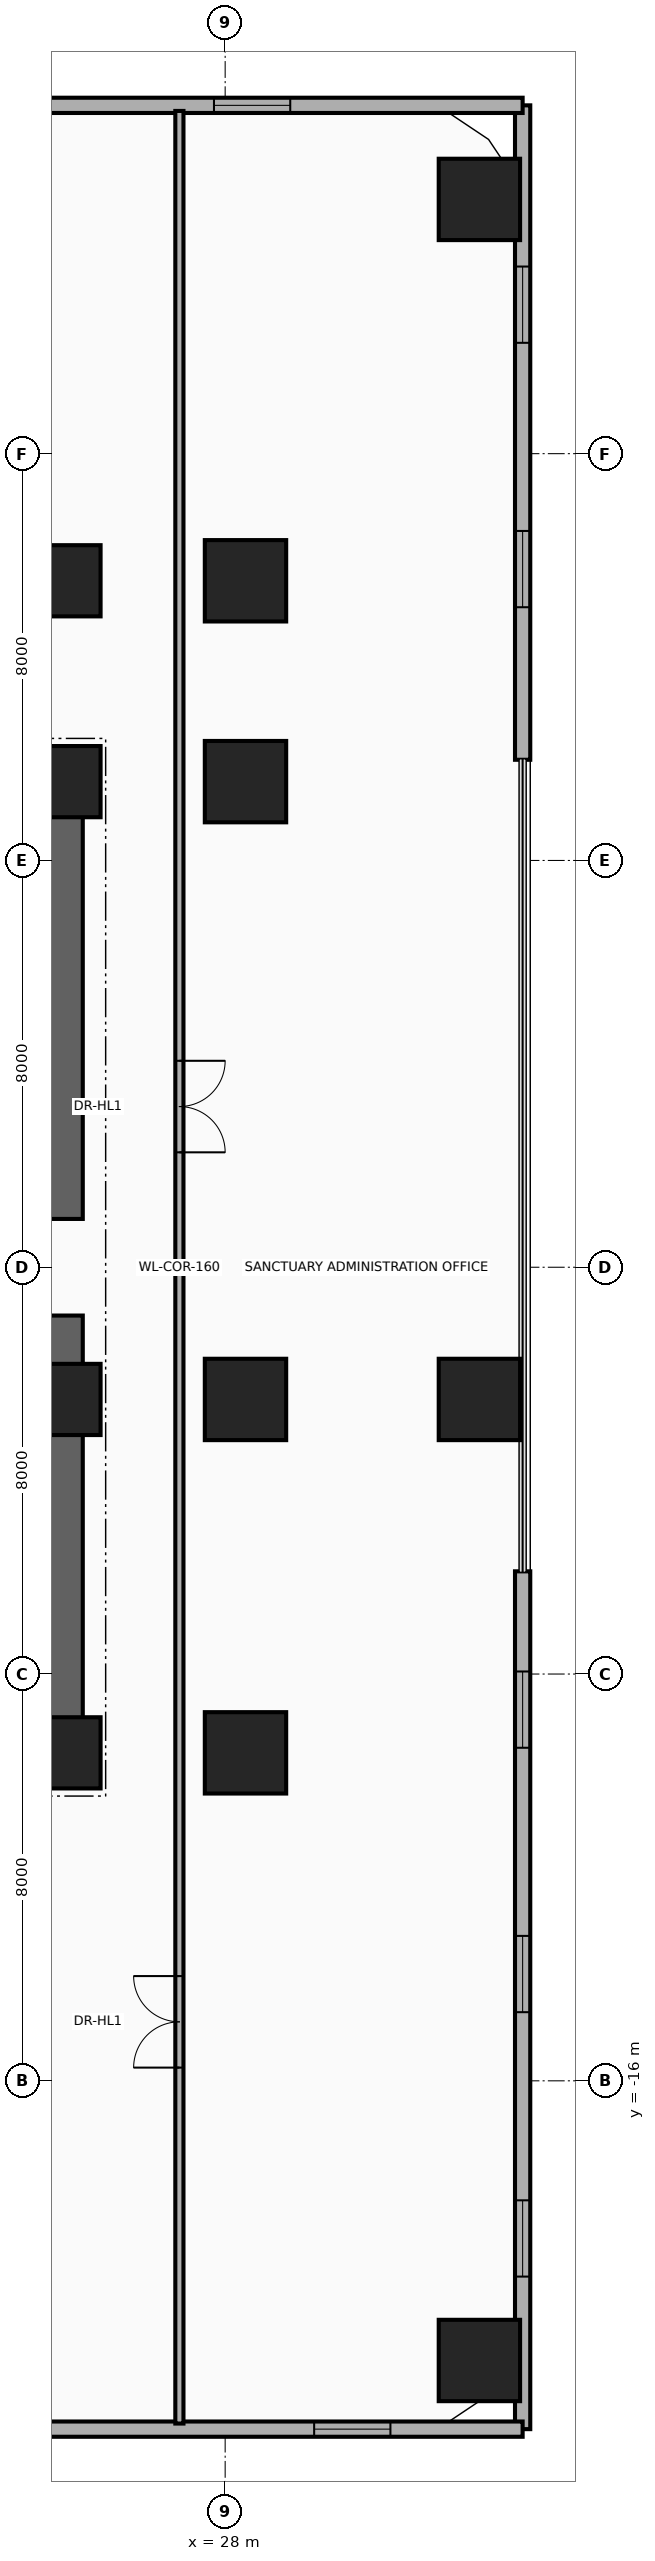
"""IFC4 building model, lengths in metres.
Left out: names, types, materials, properties, quantities, classifications, styles, units other than length and angle.
Written with IfcOpenShell. Run it as: python <this file> out.ifc"""

import sys

from ifc_helpers import new_model, si_unit, direction, frame, frame_2d, origin, origin_2d, place, context, subcontext, project, spatial, rectangle, extrude, source, transform, mapped, element, fill, save


model = new_model("IFC4")
c1 = context("Model", 3, precision=1e-05, world=origin(), true_north=direction((0.0, 1.0)))
c2 = subcontext(c1, "Body", "Model", "MODEL_VIEW")
j1 = project(units=[si_unit("LENGTHUNIT", "METRE"), si_unit("PLANEANGLEUNIT", "RADIAN")], contexts=[c1])
p1 = place(None, origin())
s1 = spatial("IfcSite", under=j1, at=p1, CompositionType="ELEMENT")
p2 = place(p1, origin())
s2 = spatial("IfcBuilding", under=s1, at=p2, CompositionType="ELEMENT")
p3 = place(p2, frame((0.0, 0.0, 5.2)))
s3 = spatial("IfcBuildingStorey", under=s2, at=p3, CompositionType="ELEMENT", Elevation=5.2)
for number, where, z_axis, x_axis in (
    (1, (24.85, -9.9, 0.0), (0.0, 0.0, 1.0), (0.0, 1.0, 0.0)),
    (2, (24.85, 0.95, 0.0), (0.0, 0.0, 1.0), (0.0, 1.0, 0.0)),
):
    element("IfcWall", number, at=place(p3, frame(where, z_axis=z_axis, x_axis=x_axis)), inside=s3, PredefinedType="SHEAR", context=c2, shape_type="SweptSolid", body=[
        extrude(rectangle(XDim=8.95, YDim=0.7, at=frame_2d((4.475, 0.0))), origin(), (0.0, 0.0, 1.0), 4.92),
    ])
for number, where, z_axis, x_axis in (
    (3, (15.85, 9.55, 0.0), (0.0, 0.0, 1.0), (1.0, 0.0, 0.0)),
    (4, (15.85, -9.55, 0.0), (0.0, 0.0, 1.0), (1.0, 0.0, 0.0)),
):
    element("IfcWall", number, at=place(p3, frame(where, z_axis=z_axis, x_axis=x_axis)), inside=s3, PredefinedType="SHEAR", context=c2, shape_type="SweptSolid", body=[
        extrude(rectangle(XDim=9.0, YDim=0.7, at=frame_2d((4.5, 0.0))), origin(), (0.0, 0.0, 1.0), 4.92),
    ])
m1 = source(origin(), c2, "Body", "SweptSolid", [
    extrude(rectangle(XDim=1.4, YDim=1.4, at=origin_2d()), origin(), (0.0, 0.0, 1.0), 5.2),
])
p4 = place(p3, frame((24.85, -9.55, 0.0), z_axis=(0.0, 0.0, 1.0), x_axis=(1.0, 0.0, 0.0)))
e5 = element("IfcColumn", 5, at=p4, inside=s3, PredefinedType="COLUMN", context=c2, shape_type="MappedRepresentation", body=[
    mapped(m1, transform((0.0, 0.0, 0.0), x_axis=(1.0, 0.0, 0.0), y_axis=(0.0, 1.0, 0.0), z_axis=(0.0, 0.0, 1.0), scale=1.0)),
])
m2 = source(origin(), c2, "Body", "SweptSolid", [
    extrude(rectangle(XDim=1.6, YDim=1.6, at=origin_2d()), origin(), (0.0, 0.0, 1.0), 5.2),
])
p5 = place(p3, frame((28.4, -9.55, 0.0), z_axis=(0.0, 0.0, 1.0), x_axis=(1.0, 0.0, 0.0)))
e6 = element("IfcColumn", 6, at=p5, inside=s3, PredefinedType="COLUMN", context=c2, shape_type="MappedRepresentation", body=[
    mapped(m2, transform((0.0, 0.0, 0.0), x_axis=(1.0, 0.0, 0.0), y_axis=(0.0, 1.0, 0.0), z_axis=(0.0, 0.0, 1.0), scale=1.0)),
])
p6 = place(p3, frame((24.85, -2.6, 0.0), z_axis=(0.0, 0.0, 1.0), x_axis=(1.0, 0.0, 0.0)))
e7 = element("IfcColumn", 7, at=p6, inside=s3, PredefinedType="COLUMN", context=c2, shape_type="MappedRepresentation", body=[
    mapped(m1, transform((0.0, 0.0, 0.0), x_axis=(1.0, 0.0, 0.0), y_axis=(0.0, 1.0, 0.0), z_axis=(0.0, 0.0, 1.0), scale=1.0)),
])
p7 = place(p3, frame((28.4, -2.6, 0.0), z_axis=(0.0, 0.0, 1.0), x_axis=(1.0, 0.0, 0.0)))
e8 = element("IfcColumn", 8, at=p7, inside=s3, PredefinedType="COLUMN", context=c2, shape_type="MappedRepresentation", body=[
    mapped(m2, transform((0.0, 0.0, 0.0), x_axis=(1.0, 0.0, 0.0), y_axis=(0.0, 1.0, 0.0), z_axis=(0.0, 0.0, 1.0), scale=1.0)),
])
p8 = place(p3, frame((24.85, 9.55, 0.0), z_axis=(0.0, 0.0, 1.0), x_axis=(1.0, 0.0, 0.0)))
e9 = element("IfcColumn", 9, at=p8, inside=s3, PredefinedType="COLUMN", context=c2, shape_type="MappedRepresentation", body=[
    mapped(m1, transform((0.0, 0.0, 0.0), x_axis=(1.0, 0.0, 0.0), y_axis=(0.0, 1.0, 0.0), z_axis=(0.0, 0.0, 1.0), scale=1.0)),
])
p9 = place(p3, frame((28.4, 9.55, 0.0), z_axis=(0.0, 0.0, 1.0), x_axis=(1.0, 0.0, 0.0)))
e10 = element("IfcColumn", 10, at=p9, inside=s3, PredefinedType="COLUMN", context=c2, shape_type="MappedRepresentation", body=[
    mapped(m2, transform((0.0, 0.0, 0.0), x_axis=(1.0, 0.0, 0.0), y_axis=(0.0, 1.0, 0.0), z_axis=(0.0, 0.0, 1.0), scale=1.0)),
])
p10 = place(p3, frame((24.85, 13.5, 0.0), z_axis=(0.0, 0.0, 1.0), x_axis=(1.0, 0.0, 0.0)))
e11 = element("IfcColumn", 11, at=p10, inside=s3, PredefinedType="COLUMN", context=c2, shape_type="MappedRepresentation", body=[
    mapped(m1, transform((0.0, 0.0, 0.0), x_axis=(1.0, 0.0, 0.0), y_axis=(0.0, 1.0, 0.0), z_axis=(0.0, 0.0, 1.0), scale=1.0)),
])
for number, where, z_axis, x_axis in (
    (12, (28.4, 13.5, 0.0), (0.0, 0.0, 1.0), (1.0, 0.0, 0.0)),
    (13, (33.0, 21.0, 0.0), (0.0, 0.0, 1.0), (1.0, 0.0, 0.0)),
    (14, (33.0, -2.6, 0.0), (0.0, 0.0, 1.0), (1.0, 0.0, 0.0)),
    (15, (33.0, -21.5, 0.0), (0.0, 0.0, 1.0), (1.0, 0.0, 0.0)),
):
    element("IfcColumn", number, at=place(p3, frame(where, z_axis=z_axis, x_axis=x_axis)), inside=s3, PredefinedType="COLUMN", context=c2, shape_type="MappedRepresentation", body=[
        mapped(m2, transform((0.0, 0.0, 0.0), x_axis=(1.0, 0.0, 0.0), y_axis=(0.0, 1.0, 0.0), z_axis=(0.0, 0.0, 1.0), scale=1.0)),
    ])
p11 = place(p3, frame((33.85, -22.85, 0.0), z_axis=(0.0, 0.0, 1.0), x_axis=(0.0, 1.0, 0.0)))
e16 = element("IfcWall", 16, at=p11, inside=s3, PredefinedType="SOLIDWALL", context=c2, shape_type="SweptSolid", body=[
    extrude(rectangle(XDim=16.87, YDim=0.3, at=frame_2d((8.435, 0.0))), origin(), (0.0, 0.0, 1.0), 4.92),
])
p12 = place(p11, frame((3.0, 0.0, 0.9)))
e17 = element("IfcOpeningElement", 17, at=p12, cuts=e16, PredefinedType="OPENING", context=c2, shape_type="SweptSolid", body=[
    extrude(rectangle(XDim=1.5, YDim=1.75, at=frame_2d((0.75, 0.875))), frame((0.0, 0.165, 0.0), z_axis=(0.0, -1.0, 0.0), x_axis=(1.0, 0.0, 0.0)), (0.0, 0.0, 1.0), 0.33),
])
p13 = place(p11, frame((8.2, 0.0, 0.9)))
e18 = element("IfcOpeningElement", 18, at=p13, cuts=e16, PredefinedType="OPENING", context=c2, shape_type="SweptSolid", body=[
    extrude(rectangle(XDim=1.5, YDim=1.75, at=frame_2d((0.75, 0.875))), frame((0.0, 0.165, 0.0), z_axis=(0.0, -1.0, 0.0), x_axis=(1.0, 0.0, 0.0)), (0.0, 0.0, 1.0), 0.33),
])
p14 = place(p11, frame((13.4, 0.0, 0.9)))
e19 = element("IfcOpeningElement", 19, at=p14, cuts=e16, PredefinedType="OPENING", context=c2, shape_type="SweptSolid", body=[
    extrude(rectangle(XDim=1.5, YDim=1.75, at=frame_2d((0.75, 0.875))), frame((0.0, 0.165, 0.0), z_axis=(0.0, -1.0, 0.0), x_axis=(1.0, 0.0, 0.0)), (0.0, 0.0, 1.0), 0.33),
])
p15 = place(p3, frame((33.85, 9.98, 0.0), z_axis=(0.0, 0.0, 1.0), x_axis=(0.0, 1.0, 0.0)))
e20 = element("IfcWall", 20, at=p15, inside=s3, PredefinedType="SOLIDWALL", context=c2, shape_type="SweptSolid", body=[
    extrude(rectangle(XDim=12.87, YDim=0.3, at=frame_2d((6.435, 0.0))), origin(), (0.0, 0.0, 1.0), 4.92),
])
p16 = place(p15, frame((3.0, 0.0, 0.9)))
e21 = element("IfcOpeningElement", 21, at=p16, cuts=e20, PredefinedType="OPENING", context=c2, shape_type="SweptSolid", body=[
    extrude(rectangle(XDim=1.5, YDim=1.75, at=frame_2d((0.75, 0.875))), frame((0.0, 0.165, 0.0), z_axis=(0.0, -1.0, 0.0), x_axis=(1.0, 0.0, 0.0)), (0.0, 0.0, 1.0), 0.33),
])
p17 = place(p15, frame((8.2, 0.0, 0.9)))
e22 = element("IfcOpeningElement", 22, at=p17, cuts=e20, PredefinedType="OPENING", context=c2, shape_type="SweptSolid", body=[
    extrude(rectangle(XDim=1.5, YDim=1.75, at=frame_2d((0.75, 0.875))), frame((0.0, 0.165, 0.0), z_axis=(0.0, -1.0, 0.0), x_axis=(1.0, 0.0, 0.0)), (0.0, 0.0, 1.0), 0.33),
])
p18 = place(p3, frame((12.15, -22.85, 0.0), z_axis=(0.0, 0.0, 1.0), x_axis=(1.0, 0.0, 0.0)))
e23 = element("IfcWall", 23, at=p18, inside=s3, PredefinedType="SOLIDWALL", context=c2, shape_type="SweptSolid", body=[
    extrude(rectangle(XDim=21.7, YDim=0.3, at=frame_2d((10.85, 0.0))), origin(), (0.0, 0.0, 1.0), 4.92),
])
p19 = place(p18, frame((3.2, 0.0, 0.9)))
e24 = element("IfcOpeningElement", 24, at=p19, cuts=e23, PredefinedType="OPENING", context=c2, shape_type="SweptSolid", body=[
    extrude(rectangle(XDim=1.5, YDim=1.75, at=frame_2d((0.75, 0.875))), frame((0.0, 0.165, 0.0), z_axis=(0.0, -1.0, 0.0), x_axis=(1.0, 0.0, 0.0)), (0.0, 0.0, 1.0), 0.33),
])
p20 = place(p18, frame((9.8, 0.0, 0.9)))
e25 = element("IfcOpeningElement", 25, at=p20, cuts=e23, PredefinedType="OPENING", context=c2, shape_type="SweptSolid", body=[
    extrude(rectangle(XDim=1.5, YDim=1.75, at=frame_2d((0.75, 0.875))), frame((0.0, 0.165, 0.0), z_axis=(0.0, -1.0, 0.0), x_axis=(1.0, 0.0, 0.0)), (0.0, 0.0, 1.0), 0.33),
])
p21 = place(p18, frame((17.6, 0.0, 0.9)))
e26 = element("IfcOpeningElement", 26, at=p21, cuts=e23, PredefinedType="OPENING", context=c2, shape_type="SweptSolid", body=[
    extrude(rectangle(XDim=1.5, YDim=1.75, at=frame_2d((0.75, 0.875))), frame((0.0, 0.165, 0.0), z_axis=(0.0, -1.0, 0.0), x_axis=(1.0, 0.0, 0.0)), (0.0, 0.0, 1.0), 0.33),
])
p22 = place(p3, frame((9.98, 22.85, 0.0), z_axis=(0.0, 0.0, 1.0), x_axis=(1.0, 0.0, 0.0)))
e27 = element("IfcWall", 27, at=p22, inside=s3, PredefinedType="SOLIDWALL", context=c2, shape_type="SweptSolid", body=[
    extrude(rectangle(XDim=23.87, YDim=0.3, at=frame_2d((11.935, 0.0))), origin(), (0.0, 0.0, 1.0), 4.92),
])
p23 = place(p22, frame((3.2, 0.0, 0.9)))
e28 = element("IfcOpeningElement", 28, at=p23, cuts=e27, PredefinedType="OPENING", context=c2, shape_type="SweptSolid", body=[
    extrude(rectangle(XDim=1.5, YDim=1.75, at=frame_2d((0.75, 0.875))), frame((0.0, 0.165, 0.0), z_axis=(0.0, -1.0, 0.0), x_axis=(1.0, 0.0, 0.0)), (0.0, 0.0, 1.0), 0.33),
])
p24 = place(p22, frame((10.0, 0.0, 0.9)))
e29 = element("IfcOpeningElement", 29, at=p24, cuts=e27, PredefinedType="OPENING", context=c2, shape_type="SweptSolid", body=[
    extrude(rectangle(XDim=1.5, YDim=1.75, at=frame_2d((0.75, 0.875))), frame((0.0, 0.165, 0.0), z_axis=(0.0, -1.0, 0.0), x_axis=(1.0, 0.0, 0.0)), (0.0, 0.0, 1.0), 0.33),
])
p25 = place(p22, frame((17.8, 0.0, 0.9)))
e30 = element("IfcOpeningElement", 30, at=p25, cuts=e27, PredefinedType="OPENING", context=c2, shape_type="SweptSolid", body=[
    extrude(rectangle(XDim=1.5, YDim=1.75, at=frame_2d((0.75, 0.875))), frame((0.0, 0.165, 0.0), z_axis=(0.0, -1.0, 0.0), x_axis=(1.0, 0.0, 0.0)), (0.0, 0.0, 1.0), 0.33),
])
p26 = place(p3, frame((27.1, -22.74, 0.0), z_axis=(0.0, 0.0, 1.0), x_axis=(0.0, 1.0, 0.0)))
e31 = element("IfcWall", 31, at=p26, inside=s3, PredefinedType="PARTITIONING", context=c2, shape_type="SweptSolid", body=[
    extrude(rectangle(XDim=45.48, YDim=0.16, at=frame_2d((22.74, 0.0))), origin(), (0.0, 0.0, 1.0), 3.957),
])
p27 = place(p26, frame((7.0, 0.0, 0.0)))
e32 = element("IfcOpeningElement", 32, at=p27, cuts=e31, PredefinedType="OPENING", context=c2, shape_type="SweptSolid", body=[
    extrude(rectangle(XDim=1.8, YDim=2.15, at=frame_2d((0.9, 1.075))), frame((0.0, 0.095, 0.0), z_axis=(0.0, -1.0, 0.0), x_axis=(1.0, 0.0, 0.0)), (0.0, 0.0, 1.0), 0.19),
])
p28 = place(p26, frame((25.0, 0.0, 0.0)))
e33 = element("IfcOpeningElement", 33, at=p28, cuts=e31, PredefinedType="OPENING", context=c2, shape_type="SweptSolid", body=[
    extrude(rectangle(XDim=1.8, YDim=2.15, at=frame_2d((0.9, 1.075))), frame((0.0, 0.095, 0.0), z_axis=(0.0, -1.0, 0.0), x_axis=(1.0, 0.0, 0.0)), (0.0, 0.0, 1.0), 0.19),
])
p29 = place(p12, origin())
e34 = element("IfcWindow", 34, at=p29, inside=s3, PartitioningType="SINGLE_PANEL", PredefinedType="WINDOW", context=c2, shape_type="SweptSolid", body=[
    extrude(rectangle(XDim=1.5, YDim=1.75, at=frame_2d((0.75, 0.875))), frame((0.0, 0.03, 0.0), z_axis=(0.0, -1.0, 0.0), x_axis=(1.0, 0.0, 0.0)), (0.0, 0.0, 1.0), 0.06),
])
fill(e17, e34)
p30 = place(p13, origin())
e35 = element("IfcWindow", 35, at=p30, inside=s3, PartitioningType="SINGLE_PANEL", PredefinedType="WINDOW", context=c2, shape_type="SweptSolid", body=[
    extrude(rectangle(XDim=1.5, YDim=1.75, at=frame_2d((0.75, 0.875))), frame((0.0, 0.03, 0.0), z_axis=(0.0, -1.0, 0.0), x_axis=(1.0, 0.0, 0.0)), (0.0, 0.0, 1.0), 0.06),
])
fill(e18, e35)
p31 = place(p14, origin())
e36 = element("IfcWindow", 36, at=p31, inside=s3, PartitioningType="SINGLE_PANEL", PredefinedType="WINDOW", context=c2, shape_type="SweptSolid", body=[
    extrude(rectangle(XDim=1.5, YDim=1.75, at=frame_2d((0.75, 0.875))), frame((0.0, 0.03, 0.0), z_axis=(0.0, -1.0, 0.0), x_axis=(1.0, 0.0, 0.0)), (0.0, 0.0, 1.0), 0.06),
])
fill(e19, e36)
p32 = place(p16, origin())
e37 = element("IfcWindow", 37, at=p32, inside=s3, PartitioningType="SINGLE_PANEL", PredefinedType="WINDOW", context=c2, shape_type="SweptSolid", body=[
    extrude(rectangle(XDim=1.5, YDim=1.75, at=frame_2d((0.75, 0.875))), frame((0.0, 0.03, 0.0), z_axis=(0.0, -1.0, 0.0), x_axis=(1.0, 0.0, 0.0)), (0.0, 0.0, 1.0), 0.06),
])
fill(e21, e37)
p33 = place(p17, origin())
e38 = element("IfcWindow", 38, at=p33, inside=s3, PartitioningType="SINGLE_PANEL", PredefinedType="WINDOW", context=c2, shape_type="SweptSolid", body=[
    extrude(rectangle(XDim=1.5, YDim=1.75, at=frame_2d((0.75, 0.875))), frame((0.0, 0.03, 0.0), z_axis=(0.0, -1.0, 0.0), x_axis=(1.0, 0.0, 0.0)), (0.0, 0.0, 1.0), 0.06),
])
fill(e22, e38)
p34 = place(p21, origin())
e39 = element("IfcWindow", 39, at=p34, inside=s3, PartitioningType="SINGLE_PANEL", PredefinedType="WINDOW", context=c2, shape_type="SweptSolid", body=[
    extrude(rectangle(XDim=1.5, YDim=1.75, at=frame_2d((0.75, 0.875))), frame((0.0, 0.03, 0.0), z_axis=(0.0, -1.0, 0.0), x_axis=(1.0, 0.0, 0.0)), (0.0, 0.0, 1.0), 0.06),
])
fill(e26, e39)
p35 = place(p25, origin())
e40 = element("IfcWindow", 40, at=p35, inside=s3, PartitioningType="SINGLE_PANEL", PredefinedType="WINDOW", context=c2, shape_type="SweptSolid", body=[
    extrude(rectangle(XDim=1.5, YDim=1.75, at=frame_2d((0.75, 0.875))), frame((0.0, 0.03, 0.0), z_axis=(0.0, -1.0, 0.0), x_axis=(1.0, 0.0, 0.0)), (0.0, 0.0, 1.0), 0.06),
])
fill(e30, e40)
p36 = place(p27, origin())
e41 = element("IfcDoor", 41, at=p36, inside=s3, OperationType="DOUBLE_DOOR_SINGLE_SWING", PredefinedType="DOOR", context=c2, shape_type="SweptSolid", body=[
    extrude(rectangle(XDim=1.8, YDim=2.15, at=frame_2d((0.9, 1.075))), frame((0.0, 0.025, 0.0), z_axis=(0.0, -1.0, 0.0), x_axis=(1.0, 0.0, 0.0)), (0.0, 0.0, 1.0), 0.05),
])
fill(e32, e41)
p37 = place(p28, frame((1.8, 0.0, 0.0), z_axis=(0.0, 0.0, 1.0), x_axis=(-1.0, 0.0, 0.0)))
e42 = element("IfcDoor", 42, at=p37, inside=s3, OperationType="DOUBLE_DOOR_SINGLE_SWING", PredefinedType="DOOR", context=c2, shape_type="SweptSolid", body=[
    extrude(rectangle(XDim=1.8, YDim=2.15, at=frame_2d((0.9, 1.075))), frame((0.0, 0.025, 0.0), z_axis=(0.0, -1.0, 0.0), x_axis=(1.0, 0.0, 0.0)), (0.0, 0.0, 1.0), 0.05),
])
fill(e33, e42)
save(model, sys.argv[1])
